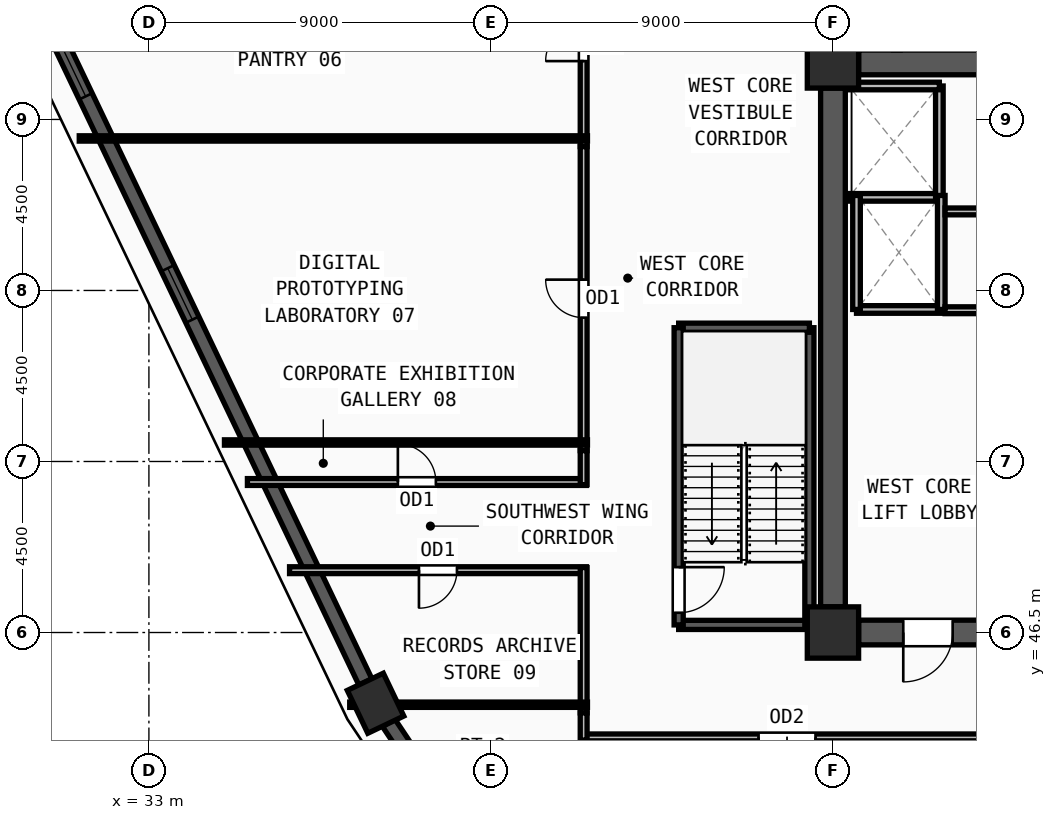
"""IFC4 building model, lengths in metres.
Left out: names, types, materials, properties, quantities, classifications, styles, units other than length and angle.
Written with IfcOpenShell. Run it as: python <this file> out.ifc"""

import sys

from ifc_helpers import new_model, si_unit, direction, frame, frame_2d, origin, origin_2d, place, context, subcontext, project, spatial, rectangle, extrude, source, transform, mapped, element, fill, save


model = new_model("IFC4")
c1 = context("Model", 3, precision=1e-05, world=origin(), true_north=direction((0.0, 1.0)))
c2 = subcontext(c1, "Body", "Model", "MODEL_VIEW")
j1 = project(units=[si_unit("LENGTHUNIT", "METRE"), si_unit("PLANEANGLEUNIT", "RADIAN")], contexts=[c1])
p1 = place(None, origin())
s1 = spatial("IfcSite", under=j1, at=p1, CompositionType="ELEMENT")
p2 = place(p1, origin())
s2 = spatial("IfcBuilding", under=s1, at=p2, CompositionType="ELEMENT")
p3 = place(p2, frame((0.0, 0.0, 270.0)))
s3 = spatial("IfcBuildingStorey", under=s2, at=p3, CompositionType="ELEMENT", Elevation=270.0)
m1 = source(origin(), c2, "Body", "SweptSolid", [
    extrude(rectangle(XDim=1.35, YDim=1.35, at=origin_2d()), origin(), (0.0, 0.0, 1.0), 3.75),
])
for number, where, z_axis, x_axis in (
    (1, (51.0, 46.5, 0.0), (0.0, 0.0, 1.0), (1.0, 0.0, 0.0)),
    (2, (51.0, 61.5, 0.0), (0.0, 0.0, 1.0), (1.0, 0.0, 0.0)),
):
    element("IfcColumn", number, at=place(p3, frame(where, z_axis=z_axis, x_axis=x_axis)), inside=s3, PredefinedType="COLUMN", context=c2, shape_type="MappedRepresentation", body=[
        mapped(m1, transform((0.0, 0.0, 0.0), x_axis=(1.0, 0.0, 0.0), y_axis=(0.0, 1.0, 0.0), z_axis=(0.0, 0.0, 1.0), scale=1.0)),
    ])
m2 = source(origin(), c2, "Body", "SweptSolid", [
    extrude(rectangle(XDim=1.25, YDim=1.05, at=origin_2d()), origin(), (0.0, 0.0, 1.0), 3.75),
])
p4 = place(p3, frame((38.964, 44.639, 0.0), z_axis=(0.0, 0.0, 1.0), x_axis=(-0.430983630323, 0.902359745553, 0.0)))
e3 = element("IfcColumn", 3, at=p4, inside=s3, PredefinedType="COLUMN", context=c2, shape_type="MappedRepresentation", body=[
    mapped(m2, transform((0.0, 0.0, 0.0), x_axis=(1.0, 0.0, 0.0), y_axis=(0.0, 1.0, 0.0), z_axis=(0.0, 0.0, 1.0), scale=1.0)),
])
p5 = place(p3, frame((28.939, 65.624, 0.0), z_axis=(0.0, 0.0, 1.0), x_axis=(0.431066278959, -0.902320266393, 0.0)))
e4 = element("IfcWall", 4, at=p5, inside=s3, PredefinedType="SOLIDWALL", context=c2, shape_type="SweptSolid", body=[
    extrude(rectangle(XDim=22.642, YDim=0.38, at=frame_2d((11.321, 0.0))), origin(), (0.0, 0.0, 1.0), 3.57),
])
m3 = source(origin(), c2, "Body", "SweptSolid", [
    extrude(rectangle(XDim=1.5, YDim=1.9, at=frame_2d((0.75, 0.95))), frame((0.0, 0.2, 0.0), z_axis=(0.0, -1.0, 0.0), x_axis=(1.0, 0.0, 0.0)), (0.0, 0.0, 1.0), 0.4),
])
p6 = place(p5, frame((4.06, 0.0, 0.55)))
e5 = element("IfcOpeningElement", 5, at=p6, cuts=e4, PredefinedType="OPENING", context=c2, shape_type="MappedRepresentation", body=[
    mapped(m3, transform((0.0, 0.0, 0.0), x_axis=(1.0, 0.0, 0.0), y_axis=(0.0, 1.0, 0.0), z_axis=(0.0, 0.0, 1.0), scale=1.0)),
])
p7 = place(p5, frame((10.571, 0.0, 0.55)))
e6 = element("IfcOpeningElement", 6, at=p7, cuts=e4, PredefinedType="OPENING", context=c2, shape_type="MappedRepresentation", body=[
    mapped(m3, transform((0.0, 0.0, 0.0), x_axis=(1.0, 0.0, 0.0), y_axis=(0.0, 1.0, 0.0), z_axis=(0.0, 0.0, 1.0), scale=1.0)),
])
p8 = place(p3, frame((39.306, 44.128, 0.0), z_axis=(0.0, 0.0, 1.0), x_axis=(0.555258257402, -0.831677983108, 0.0)))
e7 = element("IfcWall", 7, at=p8, inside=s3, PredefinedType="SOLIDWALL", context=c2, shape_type="SweptSolid", body=[
    extrude(rectangle(XDim=27.454, YDim=0.38, at=frame_2d((13.727, 0.0))), origin(), (0.0, 0.0, 1.0), 3.57),
])
p9 = place(p8, frame((6.114, 0.0, 0.55)))
e8 = element("IfcOpeningElement", 8, at=p9, cuts=e7, PredefinedType="OPENING", context=c2, shape_type="MappedRepresentation", body=[
    mapped(m3, transform((0.0, 0.0, 0.0), x_axis=(1.0, 0.0, 0.0), y_axis=(0.0, 1.0, 0.0), z_axis=(0.0, 0.0, 1.0), scale=1.0)),
])
p10 = place(p8, frame((12.977, 0.0, 0.55)))
e9 = element("IfcOpeningElement", 9, at=p10, cuts=e7, PredefinedType="OPENING", context=c2, shape_type="MappedRepresentation", body=[
    mapped(m3, transform((0.0, 0.0, 0.0), x_axis=(1.0, 0.0, 0.0), y_axis=(0.0, 1.0, 0.0), z_axis=(0.0, 0.0, 1.0), scale=1.0)),
])
p11 = place(p8, frame((19.841, 0.0, 0.55)))
e10 = element("IfcOpeningElement", 10, at=p11, cuts=e7, PredefinedType="OPENING", context=c2, shape_type="MappedRepresentation", body=[
    mapped(m3, transform((0.0, 0.0, 0.0), x_axis=(1.0, 0.0, 0.0), y_axis=(0.0, 1.0, 0.0), z_axis=(0.0, 0.0, 1.0), scale=1.0)),
])
p12 = place(p3, frame((51.675, 61.5, 0.0), z_axis=(0.0, 0.0, 1.0), x_axis=(1.0, 0.0, 0.0)))
e11 = element("IfcWall", 11, at=p12, inside=s3, PredefinedType="SHEAR", context=c2, shape_type="SweptSolid", body=[
    extrude(rectangle(XDim=7.65, YDim=0.65, at=frame_2d((3.825, 0.0))), origin(), (0.0, 0.0, 1.0), 3.57),
])
p13 = place(p3, frame((59.325, 46.5, 0.0), z_axis=(0.0, 0.0, 1.0), x_axis=(-1.0, 0.0, 0.0)))
e12 = element("IfcWall", 12, at=p13, inside=s3, PredefinedType="SHEAR", context=c2, shape_type="SweptSolid", body=[
    extrude(rectangle(XDim=7.65, YDim=0.65, at=frame_2d((3.825, 0.0))), origin(), (0.0, 0.0, 1.0), 3.57),
])
m4 = source(origin(), c2, "Body", "SweptSolid", [
    extrude(rectangle(XDim=1.3, YDim=2.2, at=frame_2d((0.65, 1.1))), frame((0.0, 0.335, 0.0), z_axis=(0.0, -1.0, 0.0), x_axis=(1.0, 0.0, 0.0)), (0.0, 0.0, 1.0), 0.67),
])
p14 = place(p13, frame((5.175, 0.0, 0.0)))
e13 = element("IfcOpeningElement", 13, at=p14, cuts=e12, PredefinedType="OPENING", context=c2, shape_type="MappedRepresentation", body=[
    mapped(m4, transform((0.0, 0.0, 0.0), x_axis=(1.0, 0.0, 0.0), y_axis=(0.0, 1.0, 0.0), z_axis=(0.0, 0.0, 1.0), scale=1.0)),
])
m5 = source(origin(), c2, "Body", "SweptSolid", [
    extrude(rectangle(XDim=1.0, YDim=2.2, at=frame_2d((0.5, 1.1))), frame((0.0, 0.335, 0.0), z_axis=(0.0, -1.0, 0.0), x_axis=(1.0, 0.0, 0.0)), (0.0, 0.0, 1.0), 0.67),
])
p15 = place(p13, frame((0.675, 0.0, 0.0)))
e14 = element("IfcOpeningElement", 14, at=p15, cuts=e12, PredefinedType="OPENING", context=c2, shape_type="MappedRepresentation", body=[
    mapped(m5, transform((0.0, 0.0, 0.0), x_axis=(1.0, 0.0, 0.0), y_axis=(0.0, 1.0, 0.0), z_axis=(0.0, 0.0, 1.0), scale=1.0)),
])
p16 = place(p3, frame((51.0, 47.175, 0.0), z_axis=(0.0, 0.0, 1.0), x_axis=(0.0, 1.0, 0.0)))
e15 = element("IfcWall", 15, at=p16, inside=s3, PredefinedType="SHEAR", context=c2, shape_type="SweptSolid", body=[
    extrude(rectangle(XDim=13.65, YDim=0.65, at=frame_2d((6.825, 0.0))), origin(), (0.0, 0.0, 1.0), 3.57),
])
p17 = place(p3, frame((46.94, 46.7, 0.0), z_axis=(0.0, 0.0, 1.0), x_axis=(1.0, 0.0, 0.0)))
e16 = element("IfcWall", 16, at=p17, inside=s3, PredefinedType="SOLIDWALL", context=c2, shape_type="SweptSolid", body=[
    extrude(rectangle(XDim=3.44, YDim=0.24, at=frame_2d((1.72, 0.0))), origin(), (0.0, 0.0, 1.0), 3.57),
])
p18 = place(p3, frame((50.38, 46.7, 0.0), z_axis=(0.0, 0.0, 1.0), x_axis=(0.0, 1.0, 0.0)))
e17 = element("IfcWall", 17, at=p18, inside=s3, PredefinedType="SOLIDWALL", context=c2, shape_type="SweptSolid", body=[
    extrude(rectangle(XDim=7.82, YDim=0.24, at=frame_2d((3.91, 0.0))), origin(), (0.0, 0.0, 1.0), 3.57),
])
p19 = place(p3, frame((50.38, 54.52, 0.0), z_axis=(0.0, 0.0, 1.0), x_axis=(-1.0, 0.0, 0.0)))
e18 = element("IfcWall", 18, at=p19, inside=s3, PredefinedType="SOLIDWALL", context=c2, shape_type="SweptSolid", body=[
    extrude(rectangle(XDim=3.44, YDim=0.24, at=frame_2d((1.72, 0.0))), origin(), (0.0, 0.0, 1.0), 3.57),
])
p20 = place(p3, frame((46.94, 54.52, 0.0), z_axis=(0.0, 0.0, 1.0), x_axis=(0.0, -1.0, 0.0)))
e19 = element("IfcWall", 19, at=p20, inside=s3, PredefinedType="SOLIDWALL", context=c2, shape_type="SweptSolid", body=[
    extrude(rectangle(XDim=7.82, YDim=0.24, at=frame_2d((3.91, 0.0))), origin(), (0.0, 0.0, 1.0), 3.57),
])
m6 = source(origin(), c2, "Body", "SweptSolid", [
    extrude(rectangle(XDim=1.2, YDim=2.2, at=frame_2d((0.6, 1.1))), frame((0.0, 0.13, 0.0), z_axis=(0.0, -1.0, 0.0), x_axis=(1.0, 0.0, 0.0)), (0.0, 0.0, 1.0), 0.26),
])
p21 = place(p20, frame((6.3, 0.0, 0.0)))
e20 = element("IfcOpeningElement", 20, at=p21, cuts=e19, PredefinedType="OPENING", context=c2, shape_type="MappedRepresentation", body=[
    mapped(m6, transform((0.0, 0.0, 0.0), x_axis=(1.0, 0.0, 0.0), y_axis=(0.0, 1.0, 0.0), z_axis=(0.0, 0.0, 1.0), scale=1.0)),
])
p22 = place(p3, frame((51.4, 57.95, 0.0), z_axis=(0.0, 0.0, 1.0), x_axis=(1.0, 0.0, 0.0)))
e21 = element("IfcWall", 21, at=p22, inside=s3, PredefinedType="SOLIDWALL", context=c2, shape_type="SweptSolid", body=[
    extrude(rectangle(XDim=2.4, YDim=0.2, at=frame_2d((1.2, 0.0))), origin(), (0.0, 0.0, 1.0), 3.57),
])
p23 = place(p3, frame((53.8, 57.95, 0.0), z_axis=(0.0, 0.0, 1.0), x_axis=(0.0, 1.0, 0.0)))
e22 = element("IfcWall", 22, at=p23, inside=s3, PredefinedType="SOLIDWALL", context=c2, shape_type="SweptSolid", body=[
    extrude(rectangle(XDim=2.93, YDim=0.2, at=frame_2d((1.465, 0.0))), origin(), (0.0, 0.0, 1.0), 3.57),
])
p24 = place(p3, frame((53.8, 60.88, 0.0), z_axis=(0.0, 0.0, 1.0), x_axis=(-1.0, 0.0, 0.0)))
e23 = element("IfcWall", 23, at=p24, inside=s3, PredefinedType="SOLIDWALL", context=c2, shape_type="SweptSolid", body=[
    extrude(rectangle(XDim=2.4, YDim=0.2, at=frame_2d((1.2, 0.0))), origin(), (0.0, 0.0, 1.0), 3.57),
])
p25 = place(p3, frame((51.62, 55.0, 0.0), z_axis=(0.0, 0.0, 1.0), x_axis=(1.0, 0.0, 0.0)))
e24 = element("IfcWall", 24, at=p25, inside=s3, PredefinedType="SOLIDWALL", context=c2, shape_type="SweptSolid", body=[
    extrude(rectangle(XDim=2.23, YDim=0.2, at=frame_2d((1.115, 0.0))), origin(), (0.0, 0.0, 1.0), 3.57),
])
for number, where, z_axis, x_axis in (
    (25, (53.85, 55.0, 0.0), (0.0, 0.0, 1.0), (0.0, 1.0, 0.0)),
    (26, (51.62, 58.0, 0.0), (0.0, 0.0, 1.0), (0.0, -1.0, 0.0)),
):
    element("IfcWall", number, at=place(p3, frame(where, z_axis=z_axis, x_axis=x_axis)), inside=s3, PredefinedType="SOLIDWALL", context=c2, shape_type="SweptSolid", body=[
        extrude(rectangle(XDim=3.0, YDim=0.2, at=frame_2d((1.5, 0.0))), origin(), (0.0, 0.0, 1.0), 3.57),
    ])
p26 = place(p3, frame((53.95, 54.98, 0.0), z_axis=(0.0, 0.0, 1.0), x_axis=(1.0, 0.0, 0.0)))
e27 = element("IfcWall", 27, at=p26, inside=s3, PredefinedType="PARTITIONING", context=c2, shape_type="SweptSolid", body=[
    extrude(rectangle(XDim=4.21, YDim=0.18, at=frame_2d((2.105, 0.0))), origin(), (0.0, 0.0, 1.0), 3.57),
])
m7 = source(origin(), c2, "Body", "SweptSolid", [
    extrude(rectangle(XDim=1.0, YDim=2.2, at=frame_2d((0.5, 1.1))), frame((0.0, 0.1, 0.0), z_axis=(0.0, -1.0, 0.0), x_axis=(1.0, 0.0, 0.0)), (0.0, 0.0, 1.0), 0.2),
])
p27 = place(p26, frame((1.6, 0.0, 0.0)))
e28 = element("IfcOpeningElement", 28, at=p27, cuts=e27, PredefinedType="OPENING", context=c2, shape_type="MappedRepresentation", body=[
    mapped(m7, transform((0.0, 0.0, 0.0), x_axis=(1.0, 0.0, 0.0), y_axis=(0.0, 1.0, 0.0), z_axis=(0.0, 0.0, 1.0), scale=1.0)),
])
p28 = place(p3, frame((44.44, 59.285, 0.0), z_axis=(0.0, 0.0, 1.0), x_axis=(0.0, 1.0, 0.0)))
e29 = element("IfcWall", 29, at=p28, inside=s3, PredefinedType="PARTITIONING", context=c2, shape_type="SweptSolid", body=[
    extrude(rectangle(XDim=5.5, YDim=0.18, at=frame_2d((2.75, 0.0))), origin(), (0.0, 0.0, 1.0), 3.57),
])
p29 = place(p28, frame((2.25, 0.0, 0.0)))
e30 = element("IfcOpeningElement", 30, at=p29, cuts=e29, PredefinedType="OPENING", context=c2, shape_type="MappedRepresentation", body=[
    mapped(m7, transform((0.0, 0.0, 0.0), x_axis=(1.0, 0.0, 0.0), y_axis=(0.0, 1.0, 0.0), z_axis=(0.0, 0.0, 1.0), scale=1.0)),
])
p30 = place(p3, frame((44.44, 51.285, 0.0), z_axis=(0.0, 0.0, 1.0), x_axis=(0.0, 1.0, 0.0)))
e31 = element("IfcWall", 31, at=p30, inside=s3, PredefinedType="PARTITIONING", context=c2, shape_type="SweptSolid", body=[
    extrude(rectangle(XDim=8.0, YDim=0.18, at=frame_2d((4.0, 0.0))), origin(), (0.0, 0.0, 1.0), 3.205),
])
p31 = place(p30, frame((3.5, 0.0, 0.0)))
e32 = element("IfcOpeningElement", 32, at=p31, cuts=e31, PredefinedType="OPENING", context=c2, shape_type="MappedRepresentation", body=[
    mapped(m7, transform((0.0, 0.0, 0.0), x_axis=(1.0, 0.0, 0.0), y_axis=(0.0, 1.0, 0.0), z_axis=(0.0, 0.0, 1.0), scale=1.0)),
])
p32 = place(p3, frame((35.592, 50.46, 0.0), z_axis=(0.0, 0.0, 1.0), x_axis=(1.0, 0.0, 0.0)))
e33 = element("IfcWall", 33, at=p32, inside=s3, PredefinedType="PARTITIONING", context=c2, shape_type="SweptSolid", body=[
    extrude(rectangle(XDim=8.918, YDim=0.18, at=frame_2d((4.459, 0.0))), origin(), (0.0, 0.0, 1.0), 3.57),
])
p33 = place(p32, frame((3.959, 0.0, 0.0)))
e34 = element("IfcOpeningElement", 34, at=p33, cuts=e33, PredefinedType="OPENING", context=c2, shape_type="MappedRepresentation", body=[
    mapped(m7, transform((0.0, 0.0, 0.0), x_axis=(1.0, 0.0, 0.0), y_axis=(0.0, 1.0, 0.0), z_axis=(0.0, 0.0, 1.0), scale=1.0)),
])
p34 = place(p3, frame((44.51, 48.14, 0.0), z_axis=(0.0, 0.0, 1.0), x_axis=(-1.0, 0.0, 0.0)))
e35 = element("IfcWall", 35, at=p34, inside=s3, PredefinedType="PARTITIONING", context=c2, shape_type="SweptSolid", body=[
    extrude(rectangle(XDim=7.809, YDim=0.18, at=frame_2d((3.905, 0.0))), origin(), (0.0, 0.0, 1.0), 3.57),
])
p35 = place(p34, frame((3.404, 0.0, 0.0)))
e36 = element("IfcOpeningElement", 36, at=p35, cuts=e35, PredefinedType="OPENING", context=c2, shape_type="MappedRepresentation", body=[
    mapped(m7, transform((0.0, 0.0, 0.0), x_axis=(1.0, 0.0, 0.0), y_axis=(0.0, 1.0, 0.0), z_axis=(0.0, 0.0, 1.0), scale=1.0)),
])
p36 = place(p3, frame((55.215, 43.74, 0.0), z_axis=(0.0, 0.0, 1.0), x_axis=(-1.0, 0.0, 0.0)))
e37 = element("IfcWall", 37, at=p36, inside=s3, PredefinedType="PARTITIONING", context=c2, shape_type="SweptSolid", body=[
    extrude(rectangle(XDim=10.845, YDim=0.18, at=frame_2d((5.422, 0.0))), origin(), (0.0, 0.0, 1.0), 3.57),
])
m8 = source(origin(), c2, "Body", "SweptSolid", [
    extrude(rectangle(XDim=1.5, YDim=2.2, at=frame_2d((0.75, 1.1))), frame((0.0, 0.1, 0.0), z_axis=(0.0, -1.0, 0.0), x_axis=(1.0, 0.0, 0.0)), (0.0, 0.0, 1.0), 0.2),
])
p37 = place(p36, frame((4.673, 0.0, 0.0)))
e38 = element("IfcOpeningElement", 38, at=p37, cuts=e37, PredefinedType="OPENING", context=c2, shape_type="MappedRepresentation", body=[
    mapped(m8, transform((0.0, 0.0, 0.0), x_axis=(1.0, 0.0, 0.0), y_axis=(0.0, 1.0, 0.0), z_axis=(0.0, 0.0, 1.0), scale=1.0)),
])
p38 = place(p3, frame((44.44, 50.39, 0.0), z_axis=(0.0, 0.0, 1.0), x_axis=(0.0, 1.0, 0.0)))
e39 = element("IfcWall", 39, at=p38, inside=s3, PredefinedType="PARTITIONING", context=c2, shape_type="SweptSolid", body=[
    extrude(rectangle(XDim=0.895, YDim=0.18, at=frame_2d((0.448, 0.0))), origin(), (0.0, 0.0, 1.0), 3.57),
])
p39 = place(p3, frame((44.44, 44.385, 0.0), z_axis=(0.0, 0.0, 1.0), x_axis=(0.0, 1.0, 0.0)))
e40 = element("IfcWall", 40, at=p39, inside=s3, PredefinedType="PARTITIONING", context=c2, shape_type="SweptSolid", body=[
    extrude(rectangle(XDim=3.825, YDim=0.18, at=frame_2d((1.913, 0.0))), origin(), (0.0, 0.0, 1.0), 3.57),
])
p40 = place(p3, frame((44.44, 43.67, 0.0), z_axis=(0.0, 0.0, 1.0), x_axis=(0.0, 1.0, 0.0)))
e41 = element("IfcWall", 41, at=p40, inside=s3, PredefinedType="PARTITIONING", context=c2, shape_type="SweptSolid", body=[
    extrude(rectangle(XDim=0.715, YDim=0.18, at=frame_2d((0.357, 0.0))), origin(), (0.0, 0.0, 1.0), 3.57),
])
p41 = place(p3, frame((44.54, 44.6, 0.0), z_axis=(0.0, 0.0, 1.0), x_axis=(-1.0, 0.0, 0.0)))
e42 = element("IfcWall", 42, at=p41, inside=s3, PredefinedType="PARTITIONING", context=c2, shape_type="SweptSolid", body=[
    extrude(rectangle(XDim=6.256, YDim=0.14, at=frame_2d((3.128, 0.0))), origin(), (0.0, 0.0, 1.0), 3.57),
])
p42 = place(p3, frame((44.54, 51.5, 0.0), z_axis=(0.0, 0.0, 1.0), x_axis=(-1.0, 0.0, 0.0)))
e43 = element("IfcWall", 43, at=p42, inside=s3, PredefinedType="PARTITIONING", context=c2, shape_type="SweptSolid", body=[
    extrude(rectangle(XDim=9.552, YDim=0.14, at=frame_2d((4.776, 0.0))), origin(), (0.0, 0.0, 1.0), 3.57),
])
p43 = place(p3, frame((44.54, 59.5, 0.0), z_axis=(0.0, 0.0, 1.0), x_axis=(-1.0, 0.0, 0.0)))
e44 = element("IfcWall", 44, at=p43, inside=s3, PredefinedType="PARTITIONING", context=c2, shape_type="SweptSolid", body=[
    extrude(rectangle(XDim=13.373, YDim=0.14, at=frame_2d((6.687, 0.0))), origin(), (0.0, 0.0, 1.0), 3.57),
])
p44 = place(p3, frame((53.95, 57.58, 0.0), z_axis=(0.0, 0.0, 1.0), x_axis=(1.0, 0.0, 0.0)))
e45 = element("IfcWall", 45, at=p44, inside=s3, PredefinedType="PARTITIONING", context=c2, shape_type="SweptSolid", body=[
    extrude(rectangle(XDim=4.21, YDim=0.18, at=frame_2d((2.105, 0.0))), origin(), (0.0, 0.0, 1.0), 3.57),
])
m9 = source(origin(), c2, "Body", "SweptSolid", [
    extrude(rectangle(XDim=1.5, YDim=1.9, at=frame_2d((0.75, 0.95))), frame((0.0, 0.03, 0.0), z_axis=(0.0, -1.0, 0.0), x_axis=(1.0, 0.0, 0.0)), (0.0, 0.0, 1.0), 0.06),
])
p45 = place(p6, origin())
e46 = element("IfcWindow", 46, at=p45, inside=s3, PartitioningType="DOUBLE_PANEL_VERTICAL", PredefinedType="WINDOW", context=c2, shape_type="MappedRepresentation", body=[
    mapped(m9, transform((0.0, 0.0, 0.0), x_axis=(1.0, 0.0, 0.0), y_axis=(0.0, 1.0, 0.0), z_axis=(0.0, 0.0, 1.0), scale=1.0)),
])
fill(e5, e46)
p46 = place(p7, origin())
e47 = element("IfcWindow", 47, at=p46, inside=s3, PartitioningType="DOUBLE_PANEL_VERTICAL", PredefinedType="WINDOW", context=c2, shape_type="MappedRepresentation", body=[
    mapped(m9, transform((0.0, 0.0, 0.0), x_axis=(1.0, 0.0, 0.0), y_axis=(0.0, 1.0, 0.0), z_axis=(0.0, 0.0, 1.0), scale=1.0)),
])
fill(e6, e47)
m10 = source(origin(), c2, "Body", "SweptSolid", [
    extrude(rectangle(XDim=1.3, YDim=2.2, at=frame_2d((0.65, 1.1))), frame((0.0, 0.025, 0.0), z_axis=(0.0, -1.0, 0.0), x_axis=(1.0, 0.0, 0.0)), (0.0, 0.0, 1.0), 0.05),
])
p47 = place(p14, origin())
e48 = element("IfcDoor", 48, at=p47, inside=s3, OperationType="SINGLE_SWING_RIGHT", PredefinedType="DOOR", context=c2, shape_type="MappedRepresentation", body=[
    mapped(m10, transform((0.0, 0.0, 0.0), x_axis=(1.0, 0.0, 0.0), y_axis=(0.0, 1.0, 0.0), z_axis=(0.0, 0.0, 1.0), scale=1.0)),
])
fill(e13, e48)
m11 = source(origin(), c2, "Body", "SweptSolid", [
    extrude(rectangle(XDim=1.2, YDim=2.2, at=frame_2d((0.6, 1.1))), frame((0.0, 0.025, 0.0), z_axis=(0.0, -1.0, 0.0), x_axis=(1.0, 0.0, 0.0)), (0.0, 0.0, 1.0), 0.05),
])
p48 = place(p21, origin())
e49 = element("IfcDoor", 49, at=p48, inside=s3, OperationType="SINGLE_SWING_LEFT", PredefinedType="DOOR", context=c2, shape_type="MappedRepresentation", body=[
    mapped(m11, transform((0.0, 0.0, 0.0), x_axis=(1.0, 0.0, 0.0), y_axis=(0.0, 1.0, 0.0), z_axis=(0.0, 0.0, 1.0), scale=1.0)),
])
fill(e20, e49)
m12 = source(origin(), c2, "Body", "SweptSolid", [
    extrude(rectangle(XDim=1.0, YDim=2.2, at=frame_2d((0.5, 1.1))), frame((0.0, 0.025, 0.0), z_axis=(0.0, -1.0, 0.0), x_axis=(1.0, 0.0, 0.0)), (0.0, 0.0, 1.0), 0.05),
])
p49 = place(p29, origin())
e50 = element("IfcDoor", 50, at=p49, inside=s3, OperationType="SINGLE_SWING_LEFT", PredefinedType="DOOR", context=c2, shape_type="MappedRepresentation", body=[
    mapped(m12, transform((0.0, 0.0, 0.0), x_axis=(1.0, 0.0, 0.0), y_axis=(0.0, 1.0, 0.0), z_axis=(0.0, 0.0, 1.0), scale=1.0)),
])
fill(e30, e50)
p50 = place(p31, origin())
e51 = element("IfcDoor", 51, at=p50, inside=s3, OperationType="SINGLE_SWING_RIGHT", PredefinedType="DOOR", context=c2, shape_type="MappedRepresentation", body=[
    mapped(m12, transform((0.0, 0.0, 0.0), x_axis=(1.0, 0.0, 0.0), y_axis=(0.0, 1.0, 0.0), z_axis=(0.0, 0.0, 1.0), scale=1.0)),
])
fill(e32, e51)
p51 = place(p33, origin())
e52 = element("IfcDoor", 52, at=p51, inside=s3, OperationType="SINGLE_SWING_LEFT", PredefinedType="DOOR", context=c2, shape_type="MappedRepresentation", body=[
    mapped(m12, transform((0.0, 0.0, 0.0), x_axis=(1.0, 0.0, 0.0), y_axis=(0.0, 1.0, 0.0), z_axis=(0.0, 0.0, 1.0), scale=1.0)),
])
fill(e34, e52)
p52 = place(p35, origin())
e53 = element("IfcDoor", 53, at=p52, inside=s3, OperationType="SINGLE_SWING_RIGHT", PredefinedType="DOOR", context=c2, shape_type="MappedRepresentation", body=[
    mapped(m12, transform((0.0, 0.0, 0.0), x_axis=(1.0, 0.0, 0.0), y_axis=(0.0, 1.0, 0.0), z_axis=(0.0, 0.0, 1.0), scale=1.0)),
])
fill(e36, e53)
m13 = source(origin(), c2, "Body", "SweptSolid", [
    extrude(rectangle(XDim=1.5, YDim=2.2, at=frame_2d((0.75, 1.1))), frame((0.0, 0.025, 0.0), z_axis=(0.0, -1.0, 0.0), x_axis=(1.0, 0.0, 0.0)), (0.0, 0.0, 1.0), 0.05),
])
p53 = place(p37, origin())
e54 = element("IfcDoor", 54, at=p53, inside=s3, OperationType="DOUBLE_DOOR_SINGLE_SWING", PredefinedType="DOOR", context=c2, shape_type="MappedRepresentation", body=[
    mapped(m13, transform((0.0, 0.0, 0.0), x_axis=(1.0, 0.0, 0.0), y_axis=(0.0, 1.0, 0.0), z_axis=(0.0, 0.0, 1.0), scale=1.0)),
])
fill(e38, e54)
save(model, sys.argv[1])
